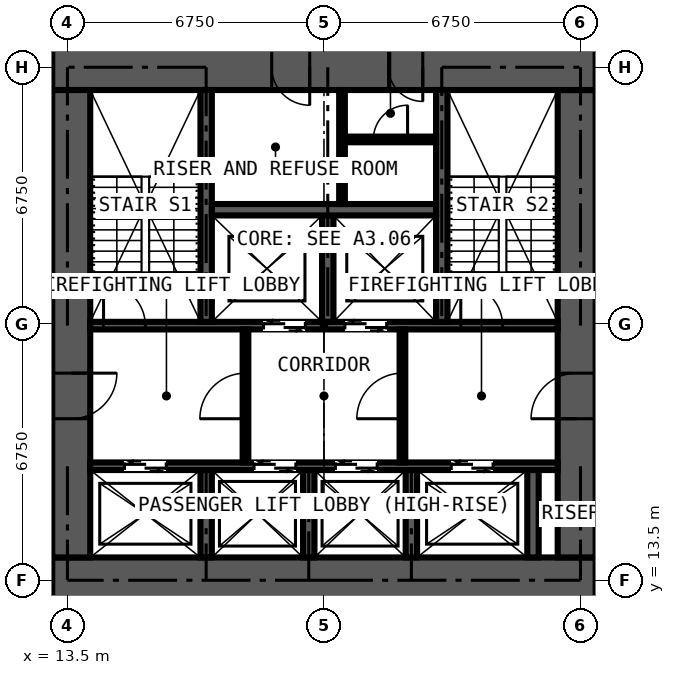
"""IFC4 building model, lengths in metres.
Left out: names, types, materials, properties, quantities, classifications, styles, units other than length and angle.
Written with IfcOpenShell. Run it as: python <this file> out.ifc"""

import sys

from ifc_helpers import new_model, si_unit, direction, frame, frame_2d, origin, place, context, subcontext, project, spatial, rectangle, extrude, element, fill, save


model = new_model("IFC4")
c1 = context("Model", 3, precision=1e-05, world=origin(), true_north=direction((0.0, 1.0)))
c2 = subcontext(c1, "Body", "Model", "MODEL_VIEW")
j1 = project(units=[si_unit("LENGTHUNIT", "METRE"), si_unit("PLANEANGLEUNIT", "RADIAN")], contexts=[c1])
p1 = place(None, origin())
s1 = spatial("IfcSite", under=j1, at=p1, CompositionType="ELEMENT")
p2 = place(p1, origin())
s2 = spatial("IfcBuilding", under=s1, at=p2, CompositionType="ELEMENT")
p3 = place(p2, frame((0.0, 0.0, 145.8)))
s3 = spatial("IfcBuildingStorey", under=s2, at=p3, CompositionType="ELEMENT", Elevation=145.8)
p4 = place(p3, frame((13.1, 13.5, 0.0), z_axis=(0.0, 0.0, 1.0), x_axis=(1.0, 0.0, 0.0)))
e1 = element("IfcWall", 1, at=p4, inside=s3, PredefinedType="SHEAR", context=c2, shape_type="SweptSolid", body=[
    extrude(rectangle(XDim=14.3, YDim=1.2, at=frame_2d((7.15, 0.0))), origin(), (0.0, 0.0, 1.0), 3.6),
])
p5 = place(p3, frame((26.9, 14.1, 0.0), z_axis=(0.0, 0.0, 1.0), x_axis=(0.0, 1.0, 0.0)))
e2 = element("IfcWall", 2, at=p5, inside=s3, PredefinedType="SHEAR", context=c2, shape_type="SweptSolid", body=[
    extrude(rectangle(XDim=12.3, YDim=1.0, at=frame_2d((6.15, 0.0))), origin(), (0.0, 0.0, 1.0), 3.6),
])
p6 = place(p5, frame((3.65, 0.0, 0.0)))
e3 = element("IfcOpeningElement", 3, at=p6, cuts=e2, PredefinedType="OPENING", context=c2, shape_type="SweptSolid", body=[
    extrude(rectangle(XDim=1.2, YDim=2.2, at=frame_2d((0.6, 1.1))), frame((0.0, 0.51, 0.0), z_axis=(0.0, -1.0, 0.0), x_axis=(1.0, 0.0, 0.0)), (0.0, 0.0, 1.0), 1.02),
])
p7 = place(p3, frame((27.4, 27.0, 0.0), z_axis=(0.0, 0.0, 1.0), x_axis=(-1.0, 0.0, 0.0)))
e4 = element("IfcWall", 4, at=p7, inside=s3, PredefinedType="SHEAR", context=c2, shape_type="SweptSolid", body=[
    extrude(rectangle(XDim=14.3, YDim=1.2, at=frame_2d((7.15, 0.0))), origin(), (0.0, 0.0, 1.0), 3.6),
])
p8 = place(p7, frame((4.55, 0.0, 0.0)))
e5 = element("IfcOpeningElement", 5, at=p8, cuts=e4, PredefinedType="OPENING", context=c2, shape_type="SweptSolid", body=[
    extrude(rectangle(XDim=0.9, YDim=2.2, at=frame_2d((0.45, 1.1))), frame((0.0, 0.61, 0.0), z_axis=(0.0, -1.0, 0.0), x_axis=(1.0, 0.0, 0.0)), (0.0, 0.0, 1.0), 1.22),
])
p9 = place(p7, frame((7.525, 0.0, 0.0)))
e6 = element("IfcOpeningElement", 6, at=p9, cuts=e4, PredefinedType="OPENING", context=c2, shape_type="SweptSolid", body=[
    extrude(rectangle(XDim=1.0, YDim=2.2, at=frame_2d((0.5, 1.1))), frame((0.0, 0.61, 0.0), z_axis=(0.0, -1.0, 0.0), x_axis=(1.0, 0.0, 0.0)), (0.0, 0.0, 1.0), 1.22),
])
p10 = place(p3, frame((13.6, 26.4, 0.0), z_axis=(0.0, 0.0, 1.0), x_axis=(0.0, -1.0, 0.0)))
e7 = element("IfcWall", 7, at=p10, inside=s3, PredefinedType="SHEAR", context=c2, shape_type="SweptSolid", body=[
    extrude(rectangle(XDim=12.3, YDim=1.0, at=frame_2d((6.15, 0.0))), origin(), (0.0, 0.0, 1.0), 3.6),
])
p11 = place(p10, frame((7.45, 0.0, 0.0)))
e8 = element("IfcOpeningElement", 8, at=p11, cuts=e7, PredefinedType="OPENING", context=c2, shape_type="SweptSolid", body=[
    extrude(rectangle(XDim=1.2, YDim=2.2, at=frame_2d((0.6, 1.1))), frame((0.0, 0.51, 0.0), z_axis=(0.0, -1.0, 0.0), x_axis=(1.0, 0.0, 0.0)), (0.0, 0.0, 1.0), 1.02),
])
p12 = place(p3, frame((14.1, 16.5, 0.0), z_axis=(0.0, 0.0, 1.0), x_axis=(1.0, 0.0, 0.0)))
e9 = element("IfcWall", 9, at=p12, inside=s3, PredefinedType="SHEAR", context=c2, shape_type="SweptSolid", body=[
    extrude(rectangle(XDim=12.3, YDim=0.2, at=frame_2d((6.15, 0.0))), origin(), (0.0, 0.0, 1.0), 3.6),
])
p13 = place(p12, frame((0.9, 0.0, 0.0)))
e10 = element("IfcOpeningElement", 10, at=p13, cuts=e9, PredefinedType="OPENING", context=c2, shape_type="SweptSolid", body=[
    extrude(rectangle(XDim=1.1, YDim=2.2, at=frame_2d((0.55, 1.1))), frame((0.0, 0.11, 0.0), z_axis=(0.0, -1.0, 0.0), x_axis=(1.0, 0.0, 0.0)), (0.0, 0.0, 1.0), 0.22),
])
p14 = place(p12, frame((4.31, 0.0, 0.0)))
e11 = element("IfcOpeningElement", 11, at=p14, cuts=e9, PredefinedType="OPENING", context=c2, shape_type="SweptSolid", body=[
    extrude(rectangle(XDim=1.1, YDim=2.2, at=frame_2d((0.55, 1.1))), frame((0.0, 0.11, 0.0), z_axis=(0.0, -1.0, 0.0), x_axis=(1.0, 0.0, 0.0)), (0.0, 0.0, 1.0), 0.22),
])
p15 = place(p12, frame((6.45, 0.0, 0.0)))
e12 = element("IfcOpeningElement", 12, at=p15, cuts=e9, PredefinedType="OPENING", context=c2, shape_type="SweptSolid", body=[
    extrude(rectangle(XDim=1.1, YDim=2.2, at=frame_2d((0.55, 1.1))), frame((0.0, 0.11, 0.0), z_axis=(0.0, -1.0, 0.0), x_axis=(1.0, 0.0, 0.0)), (0.0, 0.0, 1.0), 0.22),
])
p16 = place(p12, frame((9.5, 0.0, 0.0)))
e13 = element("IfcOpeningElement", 13, at=p16, cuts=e9, PredefinedType="OPENING", context=c2, shape_type="SweptSolid", body=[
    extrude(rectangle(XDim=1.1, YDim=2.2, at=frame_2d((0.55, 1.1))), frame((0.0, 0.11, 0.0), z_axis=(0.0, -1.0, 0.0), x_axis=(1.0, 0.0, 0.0)), (0.0, 0.0, 1.0), 0.22),
])
p17 = place(p3, frame((14.1, 20.2, 0.0), z_axis=(0.0, 0.0, 1.0), x_axis=(1.0, 0.0, 0.0)))
e14 = element("IfcWall", 14, at=p17, inside=s3, PredefinedType="SHEAR", context=c2, shape_type="SweptSolid", body=[
    extrude(rectangle(XDim=12.3, YDim=0.2, at=frame_2d((6.15, 0.0))), origin(), (0.0, 0.0, 1.0), 3.6),
])
p18 = place(p17, frame((4.56, 0.0, 0.0)))
e15 = element("IfcOpeningElement", 15, at=p18, cuts=e14, PredefinedType="OPENING", context=c2, shape_type="SweptSolid", body=[
    extrude(rectangle(XDim=1.1, YDim=2.2, at=frame_2d((0.55, 1.1))), frame((0.0, 0.11, 0.0), z_axis=(0.0, -1.0, 0.0), x_axis=(1.0, 0.0, 0.0)), (0.0, 0.0, 1.0), 0.22),
])
p19 = place(p17, frame((6.7, 0.0, 0.0)))
e16 = element("IfcOpeningElement", 16, at=p19, cuts=e14, PredefinedType="OPENING", context=c2, shape_type="SweptSolid", body=[
    extrude(rectangle(XDim=1.1, YDim=2.2, at=frame_2d((0.55, 1.1))), frame((0.0, 0.11, 0.0), z_axis=(0.0, -1.0, 0.0), x_axis=(1.0, 0.0, 0.0)), (0.0, 0.0, 1.0), 0.22),
])
p20 = place(p17, frame((0.35, 0.0, 0.0)))
e17 = element("IfcOpeningElement", 17, at=p20, cuts=e14, PredefinedType="OPENING", context=c2, shape_type="SweptSolid", body=[
    extrude(rectangle(XDim=1.1, YDim=2.2, at=frame_2d((0.55, 1.1))), frame((0.0, 0.11, 0.0), z_axis=(0.0, -1.0, 0.0), x_axis=(1.0, 0.0, 0.0)), (0.0, 0.0, 1.0), 0.22),
])
p21 = place(p17, frame((9.75, 0.0, 0.0)))
e18 = element("IfcOpeningElement", 18, at=p21, cuts=e14, PredefinedType="OPENING", context=c2, shape_type="SweptSolid", body=[
    extrude(rectangle(XDim=1.1, YDim=2.2, at=frame_2d((0.55, 1.1))), frame((0.0, 0.11, 0.0), z_axis=(0.0, -1.0, 0.0), x_axis=(1.0, 0.0, 0.0)), (0.0, 0.0, 1.0), 0.22),
])
for number, where, z_axis, x_axis in (
    (19, (17.15, 20.3, 0.0), (0.0, 0.0, 1.0), (0.0, 1.0, 0.0)),
    (20, (23.35, 20.3, 0.0), (0.0, 0.0, 1.0), (0.0, 1.0, 0.0)),
):
    element("IfcWall", number, at=place(p3, frame(where, z_axis=z_axis, x_axis=x_axis)), inside=s3, PredefinedType="SHEAR", context=c2, shape_type="SweptSolid", body=[
        extrude(rectangle(XDim=6.1, YDim=0.3, at=frame_2d((3.05, 0.0))), origin(), (0.0, 0.0, 1.0), 3.6),
    ])
p22 = place(p3, frame((20.35, 20.3, 0.0), z_axis=(0.0, 0.0, 1.0), x_axis=(0.0, 1.0, 0.0)))
e21 = element("IfcWall", 21, at=p22, inside=s3, PredefinedType="SHEAR", context=c2, shape_type="SweptSolid", body=[
    extrude(rectangle(XDim=2.8, YDim=0.3, at=frame_2d((1.4, 0.0))), origin(), (0.0, 0.0, 1.0), 3.6),
])
p23 = place(p3, frame((17.3, 23.25, 0.0), z_axis=(0.0, 0.0, 1.0), x_axis=(1.0, 0.0, 0.0)))
e22 = element("IfcWall", 22, at=p23, inside=s3, PredefinedType="SHEAR", context=c2, shape_type="SweptSolid", body=[
    extrude(rectangle(XDim=5.9, YDim=0.3, at=frame_2d((2.95, 0.0))), origin(), (0.0, 0.0, 1.0), 3.6),
])
for number, where, z_axis, x_axis in (
    (23, (17.15, 14.1, 0.0), (0.0, 0.0, 1.0), (0.0, 1.0, 0.0)),
    (24, (19.85, 14.1, 0.0), (0.0, 0.0, 1.0), (0.0, 1.0, 0.0)),
    (25, (22.55, 14.1, 0.0), (0.0, 0.0, 1.0), (0.0, 1.0, 0.0)),
    (26, (25.75, 14.1, 0.0), (0.0, 0.0, 1.0), (0.0, 1.0, 0.0)),
):
    element("IfcWall", number, at=place(p3, frame(where, z_axis=z_axis, x_axis=x_axis)), inside=s3, PredefinedType="SHEAR", context=c2, shape_type="SweptSolid", body=[
        extrude(rectangle(XDim=2.3, YDim=0.3, at=frame_2d((1.15, 0.0))), origin(), (0.0, 0.0, 1.0), 3.6),
    ])
p24 = place(p3, frame((18.185, 16.6, 0.0), z_axis=(0.0, 0.0, 1.0), x_axis=(0.0, 1.0, 0.0)))
e27 = element("IfcWall", 27, at=p24, inside=s3, PredefinedType="PARTITIONING", context=c2, shape_type="SweptSolid", body=[
    extrude(rectangle(XDim=3.5, YDim=0.15, at=frame_2d((1.75, 0.0))), origin(), (0.0, 0.0, 1.0), 3.375),
])
p25 = place(p24, frame((1.15, 0.0, 0.0)))
e28 = element("IfcOpeningElement", 28, at=p25, cuts=e27, PredefinedType="OPENING", context=c2, shape_type="SweptSolid", body=[
    extrude(rectangle(XDim=1.2, YDim=2.2, at=frame_2d((0.6, 1.1))), frame((0.0, 0.085, 0.0), z_axis=(0.0, -1.0, 0.0), x_axis=(1.0, 0.0, 0.0)), (0.0, 0.0, 1.0), 0.17),
])
p26 = place(p3, frame((22.315, 16.6, 0.0), z_axis=(0.0, 0.0, 1.0), x_axis=(0.0, 1.0, 0.0)))
e29 = element("IfcWall", 29, at=p26, inside=s3, PredefinedType="PARTITIONING", context=c2, shape_type="SweptSolid", body=[
    extrude(rectangle(XDim=3.5, YDim=0.15, at=frame_2d((1.75, 0.0))), origin(), (0.0, 0.0, 1.0), 3.375),
])
p27 = place(p26, frame((1.15, 0.0, 0.0)))
e30 = element("IfcOpeningElement", 30, at=p27, cuts=e29, PredefinedType="OPENING", context=c2, shape_type="SweptSolid", body=[
    extrude(rectangle(XDim=1.2, YDim=2.2, at=frame_2d((0.6, 1.1))), frame((0.0, 0.085, 0.0), z_axis=(0.0, -1.0, 0.0), x_axis=(1.0, 0.0, 0.0)), (0.0, 0.0, 1.0), 0.17),
])
p28 = place(p3, frame((20.725, 23.4, 0.0), z_axis=(0.0, 0.0, 1.0), x_axis=(0.0, 1.0, 0.0)))
e31 = element("IfcWall", 31, at=p28, inside=s3, PredefinedType="PARTITIONING", context=c2, shape_type="SweptSolid", body=[
    extrude(rectangle(XDim=3.0, YDim=0.15, at=frame_2d((1.5, 0.0))), origin(), (0.0, 0.0, 1.0), 3.375),
])
p29 = place(p3, frame((20.8, 25.1, 0.0), z_axis=(0.0, 0.0, 1.0), x_axis=(1.0, 0.0, 0.0)))
e32 = element("IfcWall", 32, at=p29, inside=s3, PredefinedType="PARTITIONING", context=c2, shape_type="SweptSolid", body=[
    extrude(rectangle(XDim=2.4, YDim=0.15, at=frame_2d((1.2, 0.0))), origin(), (0.0, 0.0, 1.0), 3.375),
])
p30 = place(p29, frame((0.75, 0.0, 0.0)))
e33 = element("IfcOpeningElement", 33, at=p30, cuts=e32, PredefinedType="OPENING", context=c2, shape_type="SweptSolid", body=[
    extrude(rectangle(XDim=0.9, YDim=2.2, at=frame_2d((0.45, 1.1))), frame((0.0, 0.085, 0.0), z_axis=(0.0, -1.0, 0.0), x_axis=(1.0, 0.0, 0.0)), (0.0, 0.0, 1.0), 0.17),
])
p31 = place(p13, origin())
e34 = element("IfcDoor", 34, at=p31, inside=s3, OperationType="DOUBLE_DOOR_SLIDING", PredefinedType="DOOR", context=c2, shape_type="SweptSolid", body=[
    extrude(rectangle(XDim=1.1, YDim=2.2, at=frame_2d((0.55, 1.1))), frame((0.0, 0.025, 0.0), z_axis=(0.0, -1.0, 0.0), x_axis=(1.0, 0.0, 0.0)), (0.0, 0.0, 1.0), 0.05),
])
fill(e10, e34)
p32 = place(p14, origin())
e35 = element("IfcDoor", 35, at=p32, inside=s3, OperationType="DOUBLE_DOOR_SLIDING", PredefinedType="DOOR", context=c2, shape_type="SweptSolid", body=[
    extrude(rectangle(XDim=1.1, YDim=2.2, at=frame_2d((0.55, 1.1))), frame((0.0, 0.025, 0.0), z_axis=(0.0, -1.0, 0.0), x_axis=(1.0, 0.0, 0.0)), (0.0, 0.0, 1.0), 0.05),
])
fill(e11, e35)
p33 = place(p15, origin())
e36 = element("IfcDoor", 36, at=p33, inside=s3, OperationType="DOUBLE_DOOR_SLIDING", PredefinedType="DOOR", context=c2, shape_type="SweptSolid", body=[
    extrude(rectangle(XDim=1.1, YDim=2.2, at=frame_2d((0.55, 1.1))), frame((0.0, 0.025, 0.0), z_axis=(0.0, -1.0, 0.0), x_axis=(1.0, 0.0, 0.0)), (0.0, 0.0, 1.0), 0.05),
])
fill(e12, e36)
p34 = place(p16, origin())
e37 = element("IfcDoor", 37, at=p34, inside=s3, OperationType="DOUBLE_DOOR_SLIDING", PredefinedType="DOOR", context=c2, shape_type="SweptSolid", body=[
    extrude(rectangle(XDim=1.1, YDim=2.2, at=frame_2d((0.55, 1.1))), frame((0.0, 0.025, 0.0), z_axis=(0.0, -1.0, 0.0), x_axis=(1.0, 0.0, 0.0)), (0.0, 0.0, 1.0), 0.05),
])
fill(e13, e37)
p35 = place(p18, origin())
e38 = element("IfcDoor", 38, at=p35, inside=s3, OperationType="DOUBLE_DOOR_SLIDING", PredefinedType="DOOR", context=c2, shape_type="SweptSolid", body=[
    extrude(rectangle(XDim=1.1, YDim=2.2, at=frame_2d((0.55, 1.1))), frame((0.0, 0.025, 0.0), z_axis=(0.0, -1.0, 0.0), x_axis=(1.0, 0.0, 0.0)), (0.0, 0.0, 1.0), 0.05),
])
fill(e15, e38)
p36 = place(p19, origin())
e39 = element("IfcDoor", 39, at=p36, inside=s3, OperationType="DOUBLE_DOOR_SLIDING", PredefinedType="DOOR", context=c2, shape_type="SweptSolid", body=[
    extrude(rectangle(XDim=1.1, YDim=2.2, at=frame_2d((0.55, 1.1))), frame((0.0, 0.025, 0.0), z_axis=(0.0, -1.0, 0.0), x_axis=(1.0, 0.0, 0.0)), (0.0, 0.0, 1.0), 0.05),
])
fill(e16, e39)
p37 = place(p11, origin())
e40 = element("IfcDoor", 40, at=p37, inside=s3, OperationType="DOUBLE_DOOR_SINGLE_SWING", PredefinedType="DOOR", context=c2, shape_type="SweptSolid", body=[
    extrude(rectangle(XDim=1.2, YDim=2.2, at=frame_2d((0.6, 1.1))), frame((0.0, 0.025, 0.0), z_axis=(0.0, -1.0, 0.0), x_axis=(1.0, 0.0, 0.0)), (0.0, 0.0, 1.0), 0.05),
])
fill(e8, e40)
p38 = place(p6, origin())
e41 = element("IfcDoor", 41, at=p38, inside=s3, OperationType="DOUBLE_DOOR_SINGLE_SWING", PredefinedType="DOOR", context=c2, shape_type="SweptSolid", body=[
    extrude(rectangle(XDim=1.2, YDim=2.2, at=frame_2d((0.6, 1.1))), frame((0.0, 0.025, 0.0), z_axis=(0.0, -1.0, 0.0), x_axis=(1.0, 0.0, 0.0)), (0.0, 0.0, 1.0), 0.05),
])
fill(e3, e41)
p39 = place(p25, origin())
e42 = element("IfcDoor", 42, at=p39, inside=s3, OperationType="DOUBLE_DOOR_SINGLE_SWING", PredefinedType="DOOR", context=c2, shape_type="SweptSolid", body=[
    extrude(rectangle(XDim=1.2, YDim=2.2, at=frame_2d((0.6, 1.1))), frame((0.0, 0.025, 0.0), z_axis=(0.0, -1.0, 0.0), x_axis=(1.0, 0.0, 0.0)), (0.0, 0.0, 1.0), 0.05),
])
fill(e28, e42)
p40 = place(p27, origin())
e43 = element("IfcDoor", 43, at=p40, inside=s3, OperationType="DOUBLE_DOOR_SINGLE_SWING", PredefinedType="DOOR", context=c2, shape_type="SweptSolid", body=[
    extrude(rectangle(XDim=1.2, YDim=2.2, at=frame_2d((0.6, 1.1))), frame((0.0, 0.025, 0.0), z_axis=(0.0, -1.0, 0.0), x_axis=(1.0, 0.0, 0.0)), (0.0, 0.0, 1.0), 0.05),
])
fill(e30, e43)
p41 = place(p30, origin())
e44 = element("IfcDoor", 44, at=p41, inside=s3, OperationType="SINGLE_SWING_RIGHT", PredefinedType="DOOR", context=c2, shape_type="SweptSolid", body=[
    extrude(rectangle(XDim=0.9, YDim=2.2, at=frame_2d((0.45, 1.1))), frame((0.0, 0.025, 0.0), z_axis=(0.0, -1.0, 0.0), x_axis=(1.0, 0.0, 0.0)), (0.0, 0.0, 1.0), 0.05),
])
fill(e33, e44)
p42 = place(p8, origin())
e45 = element("IfcDoor", 45, at=p42, inside=s3, OperationType="SINGLE_SWING_LEFT", PredefinedType="DOOR", context=c2, shape_type="SweptSolid", body=[
    extrude(rectangle(XDim=0.9, YDim=2.2, at=frame_2d((0.45, 1.1))), frame((0.0, 0.4, 0.0), z_axis=(0.0, -1.0, 0.0), x_axis=(1.0, 0.0, 0.0)), (0.0, 0.0, 1.0), 0.8),
])
fill(e5, e45)
p43 = place(p9, origin())
e46 = element("IfcDoor", 46, at=p43, inside=s3, OperationType="SINGLE_SWING_LEFT", PredefinedType="DOOR", context=c2, shape_type="SweptSolid", body=[
    extrude(rectangle(XDim=1.0, YDim=2.2, at=frame_2d((0.5, 1.1))), frame((0.0, 0.025, 0.0), z_axis=(0.0, -1.0, 0.0), x_axis=(1.0, 0.0, 0.0)), (0.0, 0.0, 1.0), 0.05),
])
fill(e6, e46)
p44 = place(p20, origin())
e47 = element("IfcDoor", 47, at=p44, inside=s3, OperationType="SINGLE_SWING_LEFT", PredefinedType="DOOR", context=c2, shape_type="SweptSolid", body=[
    extrude(rectangle(XDim=1.1, YDim=2.2, at=frame_2d((0.55, 1.1))), frame((0.0, 0.025, 0.0), z_axis=(0.0, -1.0, 0.0), x_axis=(1.0, 0.0, 0.0)), (0.0, 0.0, 1.0), 0.05),
])
fill(e17, e47)
p45 = place(p21, origin())
e48 = element("IfcDoor", 48, at=p45, inside=s3, OperationType="SINGLE_SWING_LEFT", PredefinedType="DOOR", context=c2, shape_type="SweptSolid", body=[
    extrude(rectangle(XDim=1.1, YDim=2.2, at=frame_2d((0.55, 1.1))), frame((0.0, 0.025, 0.0), z_axis=(0.0, -1.0, 0.0), x_axis=(1.0, 0.0, 0.0)), (0.0, 0.0, 1.0), 0.05),
])
fill(e18, e48)
save(model, sys.argv[1])
